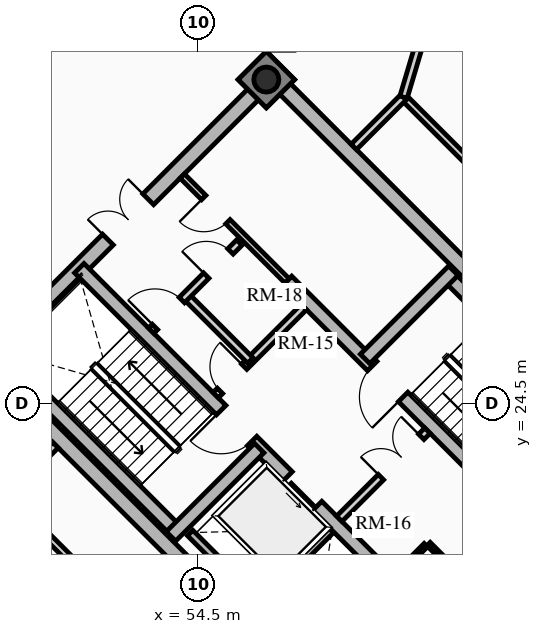
"""IFC4 building model, lengths in metres.
Left out: names, types, materials, properties, quantities, classifications, styles, units other than length and angle.
Written with IfcOpenShell. Run it as: python <this file> out.ifc"""

import sys

from ifc_helpers import new_model, si_unit, direction, frame, frame_2d, origin, origin_2d, place, context, subcontext, project, spatial, rectangle, hollow_circle, extrude, source, transform, mapped, element, fill, save


model = new_model("IFC4")
c1 = context("Model", 3, precision=1e-05, world=origin(), true_north=direction((0.0, 1.0)))
c2 = subcontext(c1, "Body", "Model", "MODEL_VIEW")
j1 = project(units=[si_unit("LENGTHUNIT", "METRE"), si_unit("PLANEANGLEUNIT", "RADIAN")], contexts=[c1])
p1 = place(None, origin())
s1 = spatial("IfcSite", under=j1, at=p1, CompositionType="ELEMENT")
p2 = place(p1, origin())
s2 = spatial("IfcBuilding", under=s1, at=p2, CompositionType="ELEMENT")
p3 = place(p2, frame((0.0, 0.0, 192.34)))
s3 = spatial("IfcBuildingStorey", under=s2, at=p3, CompositionType="ELEMENT", Elevation=192.34)
for number, where, z_axis, x_axis in (
    (1, (58.702, 15.732, 0.0), (0.0, 0.0, 1.0), (-0.707, 0.707, 0.0)),
    (2, (66.268, 23.298, 0.0), (0.0, 0.0, 1.0), (-0.707, 0.707, 0.0)),
):
    element("IfcWall", number, at=place(p3, frame(where, z_axis=z_axis, x_axis=x_axis)), inside=s3, PredefinedType="SHEAR", context=c2, shape_type="SweptSolid", body=[
        extrude(rectangle(XDim=14.1, YDim=0.4, at=frame_2d((7.05, 0.0))), origin(), (0.0, 0.0, 1.0), 4.32),
    ])
p4 = place(p3, frame((58.561, 15.873, 0.0), z_axis=(0.0, 0.0, 1.0), x_axis=(0.707106781187, 0.707106781187, 0.0)))
e3 = element("IfcWall", 3, at=p4, inside=s3, PredefinedType="SHEAR", context=c2, shape_type="SweptSolid", body=[
    extrude(rectangle(XDim=10.7, YDim=0.4, at=frame_2d((5.35, 0.0))), origin(), (0.0, 0.0, 1.0), 4.32),
])
m1 = source(origin(), c2, "Body", "SweptSolid", [
    extrude(rectangle(XDim=1.5, YDim=2.02, at=frame_2d((0.75, 1.01))), frame((0.0, 0.21, 0.0), z_axis=(0.0, -1.0, 0.0), x_axis=(1.0, 0.0, 0.0)), (0.0, 0.0, 1.0), 0.42),
])
p5 = place(p4, frame((5.45, 0.0, 0.0)))
e4 = element("IfcOpeningElement", 4, at=p5, cuts=e3, PredefinedType="OPENING", context=c2, shape_type="MappedRepresentation", body=[
    mapped(m1, transform((0.0, 0.0, 0.0), x_axis=(1.0, 0.0, 0.0), y_axis=(0.0, 1.0, 0.0), z_axis=(0.0, 0.0, 1.0), scale=1.0)),
])
p6 = place(p3, frame((48.873, 25.561, 0.0), z_axis=(0.0, 0.0, 1.0), x_axis=(0.707106781187, 0.707106781187, 0.0)))
e5 = element("IfcWall", 5, at=p6, inside=s3, PredefinedType="SHEAR", context=c2, shape_type="SweptSolid", body=[
    extrude(rectangle(XDim=10.7, YDim=0.4, at=frame_2d((5.35, 0.0))), origin(), (0.0, 0.0, 1.0), 4.32),
])
p7 = place(p6, frame((4.6, 0.0, 0.0)))
e6 = element("IfcOpeningElement", 6, at=p7, cuts=e5, PredefinedType="OPENING", context=c2, shape_type="MappedRepresentation", body=[
    mapped(m1, transform((0.0, 0.0, 0.0), x_axis=(1.0, 0.0, 0.0), y_axis=(0.0, 1.0, 0.0), z_axis=(0.0, 0.0, 1.0), scale=1.0)),
])
p8 = place(p3, frame((61.06, 18.373, 0.0), z_axis=(0.0, 0.0, 1.0), x_axis=(-0.707106781187, 0.707106781187, 0.0)))
e7 = element("IfcWall", 7, at=p8, inside=s3, PredefinedType="SHEAR", context=c2, shape_type="SweptSolid", body=[
    extrude(rectangle(XDim=13.7, YDim=0.35, at=frame_2d((6.85, 0.0))), origin(), (0.0, 0.0, 1.0), 4.32),
])
m2 = source(origin(), c2, "Body", "SweptSolid", [
    extrude(rectangle(XDim=1.1, YDim=2.015, at=frame_2d((0.55, 1.007))), frame((0.0, 0.185, 0.0), z_axis=(0.0, -1.0, 0.0), x_axis=(1.0, 0.0, 0.0)), (0.0, 0.0, 1.0), 0.37),
])
p9 = place(p8, frame((4.85, 0.0, 0.0)))
e8 = element("IfcOpeningElement", 8, at=p9, cuts=e7, PredefinedType="OPENING", context=c2, shape_type="MappedRepresentation", body=[
    mapped(m2, transform((0.0, 0.0, 0.0), x_axis=(1.0, 0.0, 0.0), y_axis=(0.0, 1.0, 0.0), z_axis=(0.0, 0.0, 1.0), scale=1.0)),
])
m3 = source(origin(), c2, "Body", "SweptSolid", [
    extrude(rectangle(XDim=1.15, YDim=2.02, at=frame_2d((0.575, 1.01))), frame((0.0, 0.185, 0.0), z_axis=(0.0, -1.0, 0.0), x_axis=(1.0, 0.0, 0.0)), (0.0, 0.0, 1.0), 0.37),
])
p10 = place(p8, frame((7.27, 0.0, 0.0)))
e9 = element("IfcOpeningElement", 9, at=p10, cuts=e7, PredefinedType="OPENING", context=c2, shape_type="MappedRepresentation", body=[
    mapped(m3, transform((0.0, 0.0, 0.0), x_axis=(1.0, 0.0, 0.0), y_axis=(0.0, 1.0, 0.0), z_axis=(0.0, 0.0, 1.0), scale=1.0)),
])
p11 = place(p3, frame((63.627, 20.94, 0.0), z_axis=(0.0, 0.0, 1.0), x_axis=(-0.707119496762, 0.707094065383, 0.0)))
e10 = element("IfcWall", 10, at=p11, inside=s3, PredefinedType="SHEAR", context=c2, shape_type="SweptSolid", body=[
    extrude(rectangle(XDim=9.6, YDim=0.35, at=frame_2d((4.8, 0.0))), origin(), (0.0, 0.0, 1.0), 4.32),
])
p12 = place(p11, frame((5.28, 0.0, 0.0)))
e11 = element("IfcOpeningElement", 11, at=p12, cuts=e10, PredefinedType="OPENING", context=c2, shape_type="MappedRepresentation", body=[
    mapped(m3, transform((0.0, 0.0, 0.0), x_axis=(1.0, 0.0, 0.0), y_axis=(0.0, 1.0, 0.0), z_axis=(0.0, 0.0, 1.0), scale=1.0)),
])
p13 = place(p3, frame((53.922, 21.141, 0.0), z_axis=(0.0, 0.0, 1.0), x_axis=(-0.707106781187, 0.707106781187, 0.0)))
e12 = element("IfcWall", 12, at=p13, inside=s3, PredefinedType="SHEAR", context=c2, shape_type="SweptSolid", body=[
    extrude(rectangle(XDim=6.695, YDim=0.35, at=frame_2d((3.348, 0.0))), origin(), (0.0, 0.0, 1.0), 4.32),
])
p14 = place(p3, frame((53.784, 21.003, 0.0), z_axis=(0.0, 0.0, 1.0), x_axis=(0.707106781187, 0.707106781187, 0.0)))
e13 = element("IfcWall", 13, at=p14, inside=s3, PredefinedType="SHEAR", context=c2, shape_type="SweptSolid", body=[
    extrude(rectangle(XDim=3.285, YDim=0.35, at=frame_2d((1.643, 0.0))), origin(), (0.0, 0.0, 1.0), 4.32),
])
p15 = place(p3, frame((65.812, 23.125, 0.0), z_axis=(0.0, 0.0, 1.0), x_axis=(-0.707106781187, 0.707106781187, 0.0)))
e14 = element("IfcWall", 14, at=p15, inside=s3, PredefinedType="SHEAR", context=c2, shape_type="SweptSolid", body=[
    extrude(rectangle(XDim=6.695, YDim=0.35, at=frame_2d((3.348, 0.0))), origin(), (0.0, 0.0, 1.0), 4.32),
])
p16 = place(p3, frame((58.893, 25.674, 0.0), z_axis=(0.0, 0.0, 1.0), x_axis=(0.707106781187, 0.707106781187, 0.0)))
e15 = element("IfcWall", 15, at=p16, inside=s3, PredefinedType="SHEAR", context=c2, shape_type="SweptSolid", body=[
    extrude(rectangle(XDim=3.285, YDim=0.35, at=frame_2d((1.643, 0.0))), origin(), (0.0, 0.0, 1.0), 4.32),
])
p17 = place(p3, frame((56.294, 33.024, 0.0), z_axis=(0.0, 0.0, 1.0), x_axis=(0.707106781187, 0.707106781187, 0.0)))
e16 = element("IfcColumn", 16, at=p17, inside=s3, PredefinedType="COLUMN", context=c2, shape_type="SweptSolid", body=[
    extrude(hollow_circle(Radius=0.33, WallThickness=0.025, at=origin_2d()), origin(), (0.0, 0.0, 1.0), 4.32),
])
p18 = place(p3, frame((55.888, 19.069, 0.0), z_axis=(0.0, 0.0, 1.0), x_axis=(0.707106781187, 0.707106781187, 0.0)))
e17 = element("IfcWall", 17, at=p18, inside=s3, PredefinedType="SHEAR", context=c2, shape_type="SweptSolid", body=[
    extrude(rectangle(XDim=2.97, YDim=0.2, at=frame_2d((1.485, 0.0))), origin(), (0.0, 0.0, 1.0), 4.32),
])
p19 = place(p3, frame((56.015, 19.366, 0.0), z_axis=(0.0, 0.0, 1.0), x_axis=(-0.707106781187, 0.707106781187, 0.0)))
e18 = element("IfcWall", 18, at=p19, inside=s3, PredefinedType="SHEAR", context=c2, shape_type="SweptSolid", body=[
    extrude(rectangle(XDim=2.44, YDim=0.2, at=frame_2d((1.22, 0.0))), origin(), (0.0, 0.0, 1.0), 4.32),
])
p20 = place(p3, frame((58.214, 21.467, 0.0), z_axis=(0.0, 0.0, 1.0), x_axis=(0.707106781187, 0.707106781187, 0.0)))
e19 = element("IfcWall", 19, at=p20, inside=s3, PredefinedType="PARTITIONING", context=c2, shape_type="SweptSolid", body=[
    extrude(rectangle(XDim=3.28, YDim=0.2, at=frame_2d((1.64, 0.0))), origin(), (0.0, 0.0, 1.0), 4.095),
])
m4 = source(origin(), c2, "Body", "SweptSolid", [
    extrude(rectangle(XDim=1.5, YDim=2.02, at=frame_2d((0.75, 1.01))), frame((0.0, 0.11, 0.0), z_axis=(0.0, -1.0, 0.0), x_axis=(1.0, 0.0, 0.0)), (0.0, 0.0, 1.0), 0.22),
])
p21 = place(p20, frame((1.55, 0.0, 0.0)))
e20 = element("IfcOpeningElement", 20, at=p21, cuts=e19, PredefinedType="OPENING", context=c2, shape_type="MappedRepresentation", body=[
    mapped(m4, transform((0.0, 0.0, 0.0), x_axis=(1.0, 0.0, 0.0), y_axis=(0.0, 1.0, 0.0), z_axis=(0.0, 0.0, 1.0), scale=1.0)),
])
p22 = place(p3, frame((54.961, 24.719, 0.0), z_axis=(0.0, 0.0, 1.0), x_axis=(0.707106781187, 0.707106781187, 0.0)))
e21 = element("IfcWall", 21, at=p22, inside=s3, PredefinedType="PARTITIONING", context=c2, shape_type="SweptSolid", body=[
    extrude(rectangle(XDim=3.28, YDim=0.2, at=frame_2d((1.64, 0.0))), origin(), (0.0, 0.0, 1.0), 4.095),
])
m5 = source(origin(), c2, "Body", "SweptSolid", [
    extrude(rectangle(XDim=0.9, YDim=2.005, at=frame_2d((0.45, 1.002))), frame((0.0, 0.11, 0.0), z_axis=(0.0, -1.0, 0.0), x_axis=(1.0, 0.0, 0.0)), (0.0, 0.0, 1.0), 0.22),
])
p23 = place(p22, frame((0.16, 0.0, 0.0)))
e22 = element("IfcOpeningElement", 22, at=p23, cuts=e21, PredefinedType="OPENING", context=c2, shape_type="MappedRepresentation", body=[
    mapped(m5, transform((0.0, 0.0, 0.0), x_axis=(1.0, 0.0, 0.0), y_axis=(0.0, 1.0, 0.0), z_axis=(0.0, 0.0, 1.0), scale=1.0)),
])
p24 = place(p3, frame((55.874, 25.631, 0.0), z_axis=(0.0, 0.0, 1.0), x_axis=(-0.707157639372, 0.707055919343, 0.0)))
e23 = element("IfcWall", 23, at=p24, inside=s3, PredefinedType="PARTITIONING", context=c2, shape_type="SweptSolid", body=[
    extrude(rectangle(XDim=2.4, YDim=0.2, at=frame_2d((1.2, 0.0))), origin(), (0.0, 0.0, 1.0), 4.095),
])
p25 = place(p3, frame((53.264, 26.416, 0.0), z_axis=(0.0, 0.0, 1.0), x_axis=(0.707106781187, 0.707106781187, 0.0)))
e24 = element("IfcWall", 24, at=p25, inside=s3, PredefinedType="PARTITIONING", context=c2, shape_type="SweptSolid", body=[
    extrude(rectangle(XDim=3.28, YDim=0.2, at=frame_2d((1.64, 0.0))), origin(), (0.0, 0.0, 1.0), 4.095),
])
m6 = source(origin(), c2, "Body", "SweptSolid", [
    extrude(rectangle(XDim=1.0, YDim=2.015, at=frame_2d((0.5, 1.007))), frame((0.0, 0.11, 0.0), z_axis=(0.0, -1.0, 0.0), x_axis=(1.0, 0.0, 0.0)), (0.0, 0.0, 1.0), 0.22),
])
p26 = place(p25, frame((0.14, 0.0, 0.0)))
e25 = element("IfcOpeningElement", 25, at=p26, cuts=e24, PredefinedType="OPENING", context=c2, shape_type="MappedRepresentation", body=[
    mapped(m6, transform((0.0, 0.0, 0.0), x_axis=(1.0, 0.0, 0.0), y_axis=(0.0, 1.0, 0.0), z_axis=(0.0, 0.0, 1.0), scale=1.0)),
])
p27 = place(p25, frame((2.05, 0.0, 0.0)))
e26 = element("IfcOpeningElement", 26, at=p27, cuts=e24, PredefinedType="OPENING", context=c2, shape_type="MappedRepresentation", body=[
    mapped(m5, transform((0.0, 0.0, 0.0), x_axis=(1.0, 0.0, 0.0), y_axis=(0.0, 1.0, 0.0), z_axis=(0.0, 0.0, 1.0), scale=1.0)),
])
p28 = place(p3, frame((61.835, 19.529, 0.0), z_axis=(0.0, 0.0, 1.0), x_axis=(-0.707174592913, 0.707038962956, 0.0)))
e27 = element("IfcWall", 27, at=p28, inside=s3, PredefinedType="PARTITIONING", context=c2, shape_type="SweptSolid", body=[
    extrude(rectangle(XDim=1.8, YDim=0.125, at=frame_2d((0.9, 0.0))), origin(), (0.0, 0.0, 1.0), 4.095),
])
m7 = source(origin(), c2, "Body", "SweptSolid", [
    extrude(rectangle(XDim=0.9, YDim=2.005, at=frame_2d((0.45, 1.002))), frame((0.0, 0.073, 0.0), z_axis=(0.0, -1.0, 0.0), x_axis=(1.0, 0.0, 0.0)), (0.0, 0.0, 1.0), 0.145),
])
p29 = place(p28, frame((0.42, 0.0, 0.0)))
e28 = element("IfcOpeningElement", 28, at=p29, cuts=e27, PredefinedType="OPENING", context=c2, shape_type="MappedRepresentation", body=[
    mapped(m7, transform((0.0, 0.0, 0.0), x_axis=(1.0, 0.0, 0.0), y_axis=(0.0, 1.0, 0.0), z_axis=(0.0, 0.0, 1.0), scale=1.0)),
])
p30 = place(p3, frame((59.713, 19.996, 0.0), z_axis=(0.0, 0.0, 1.0), x_axis=(0.707217726, 0.706995818963, 0.0)))
e29 = element("IfcWall", 29, at=p30, inside=s3, PredefinedType="PARTITIONING", context=c2, shape_type="SweptSolid", body=[
    extrude(rectangle(XDim=1.1, YDim=0.125, at=frame_2d((0.55, 0.0))), origin(), (0.0, 0.0, 1.0), 4.095),
])
p31 = place(p3, frame((56.839, 27.728, 0.0), z_axis=(0.0, 0.0, 1.0), x_axis=(-0.707106781187, 0.707106781187, 0.0)))
e30 = element("IfcWall", 30, at=p31, inside=s3, PredefinedType="PARTITIONING", context=c2, shape_type="SweptSolid", body=[
    extrude(rectangle(XDim=3.9, YDim=0.16, at=frame_2d((1.95, 0.0))), origin(), (0.0, 0.0, 1.0), 4.095),
])
m8 = source(origin(), c2, "Body", "SweptSolid", [
    extrude(rectangle(XDim=0.9, YDim=2.005, at=frame_2d((0.45, 1.002))), frame((0.0, 0.09, 0.0), z_axis=(0.0, -1.0, 0.0), x_axis=(1.0, 0.0, 0.0)), (0.0, 0.0, 1.0), 0.18),
])
p32 = place(p31, frame((2.2, 0.0, 0.0)))
e31 = element("IfcOpeningElement", 31, at=p32, cuts=e30, PredefinedType="OPENING", context=c2, shape_type="MappedRepresentation", body=[
    mapped(m8, transform((0.0, 0.0, 0.0), x_axis=(1.0, 0.0, 0.0), y_axis=(0.0, 1.0, 0.0), z_axis=(0.0, 0.0, 1.0), scale=1.0)),
])
p33 = place(p3, frame((58.419, 13.115, 0.0), z_axis=(0.0, 0.0, 1.0), x_axis=(0.707106781187, 0.707106781187, 0.0)))
e32 = element("IfcWall", 32, at=p33, inside=s3, PredefinedType="PARTITIONING", context=c2, shape_type="SweptSolid", body=[
    extrude(rectangle(XDim=14.8, YDim=0.18, at=frame_2d((7.4, 0.0))), origin(), (0.0, 0.0, 1.0), 3.386),
])
m9 = source(origin(), c2, "Body", "SweptSolid", [
    extrude(rectangle(XDim=1.4, YDim=2.02, at=frame_2d((0.7, 1.01))), frame((0.0, 0.1, 0.0), z_axis=(0.0, -1.0, 0.0), x_axis=(1.0, 0.0, 0.0)), (0.0, 0.0, 1.0), 0.2),
])
p34 = place(p33, frame((6.7, 0.0, 0.0)))
e33 = element("IfcOpeningElement", 33, at=p34, cuts=e32, PredefinedType="OPENING", context=c2, shape_type="MappedRepresentation", body=[
    mapped(m9, transform((0.0, 0.0, 0.0), x_axis=(1.0, 0.0, 0.0), y_axis=(0.0, 1.0, 0.0), z_axis=(0.0, 0.0, 1.0), scale=1.0)),
])
p35 = place(p3, frame((58.419, 13.115, 0.0), z_axis=(0.0, 0.0, 1.0), x_axis=(-0.707106781187, 0.707106781187, 0.0)))
e34 = element("IfcWall", 34, at=p35, inside=s3, PredefinedType="PARTITIONING", context=c2, shape_type="SweptSolid", body=[
    extrude(rectangle(XDim=12.7, YDim=0.18, at=frame_2d((6.35, 0.0))), origin(), (0.0, 0.0, 1.0), 3.386),
])
p36 = place(p35, frame((5.65, 0.0, 0.0)))
e35 = element("IfcOpeningElement", 35, at=p36, cuts=e34, PredefinedType="OPENING", context=c2, shape_type="MappedRepresentation", body=[
    mapped(m9, transform((0.0, 0.0, 0.0), x_axis=(1.0, 0.0, 0.0), y_axis=(0.0, 1.0, 0.0), z_axis=(0.0, 0.0, 1.0), scale=1.0)),
])
p37 = place(p3, frame((68.885, 23.581, 0.0), z_axis=(0.0, 0.0, 1.0), x_axis=(-0.707106781187, 0.707106781187, 0.0)))
e36 = element("IfcWall", 36, at=p37, inside=s3, PredefinedType="PARTITIONING", context=c2, shape_type="SweptSolid", body=[
    extrude(rectangle(XDim=12.7, YDim=0.18, at=frame_2d((6.35, 0.0))), origin(), (0.0, 0.0, 1.0), 3.386),
])
p38 = place(p37, frame((5.65, 0.0, 0.0)))
e37 = element("IfcOpeningElement", 37, at=p38, cuts=e36, PredefinedType="OPENING", context=c2, shape_type="MappedRepresentation", body=[
    mapped(m9, transform((0.0, 0.0, 0.0), x_axis=(1.0, 0.0, 0.0), y_axis=(0.0, 1.0, 0.0), z_axis=(0.0, 0.0, 1.0), scale=1.0)),
])
for number, where, z_axis, x_axis in (
    (38, (49.439, 22.096, 0.0), (0.0, 0.0, 1.0), (0.707, 0.707, 0.0)),
    (39, (58.596, 31.253, 0.0), (0.0, 0.0, 1.0), (0.707, 0.707, 0.0)),
):
    element("IfcWall", number, at=place(p3, frame(where, z_axis=z_axis, x_axis=x_axis)), inside=s3, PredefinedType="PARTITIONING", context=c2, shape_type="SweptSolid", body=[
        extrude(rectangle(XDim=1.85, YDim=0.2, at=frame_2d((0.925, 0.0))), origin(), (0.0, 0.0, 1.0), 4.095),
    ])
p39 = place(p3, frame((59.904, 32.561, 0.0), z_axis=(0.0, 0.0, 1.0), x_axis=(0.285783581439, 0.958294184778, 0.0)))
e40 = element("IfcWall", 40, at=p39, inside=s3, PredefinedType="PARTITIONING", context=c2, shape_type="SweptSolid", body=[
    extrude(rectangle(XDim=4.383, YDim=0.2, at=frame_2d((2.191, 0.0))), origin(), (0.0, 0.0, 1.0), 3.386),
])
m10 = source(origin(), c2, "Body", "SweptSolid", [
    extrude(rectangle(XDim=1.1, YDim=2.015, at=frame_2d((0.55, 1.007))), frame((0.0, 0.025, 0.0), z_axis=(0.0, -1.0, 0.0), x_axis=(1.0, 0.0, 0.0)), (0.0, 0.0, 1.0), 0.05),
])
p40 = place(p9, origin())
e41 = element("IfcDoor", 41, at=p40, inside=s3, OperationType="SLIDING_TO_LEFT", PredefinedType="DOOR", context=c2, shape_type="MappedRepresentation", body=[
    mapped(m10, transform((0.0, 0.0, 0.0), x_axis=(1.0, 0.0, 0.0), y_axis=(0.0, 1.0, 0.0), z_axis=(0.0, 0.0, 1.0), scale=1.0)),
])
fill(e8, e41)
m11 = source(origin(), c2, "Body", "SweptSolid", [
    extrude(rectangle(XDim=1.15, YDim=2.02, at=frame_2d((0.575, 1.01))), frame((0.0, 0.025, 0.0), z_axis=(0.0, -1.0, 0.0), x_axis=(1.0, 0.0, 0.0)), (0.0, 0.0, 1.0), 0.05),
])
p41 = place(p10, origin())
e42 = element("IfcDoor", 42, at=p41, inside=s3, OperationType="SINGLE_SWING_RIGHT", PredefinedType="DOOR", context=c2, shape_type="MappedRepresentation", body=[
    mapped(m11, transform((0.0, 0.0, 0.0), x_axis=(1.0, 0.0, 0.0), y_axis=(0.0, 1.0, 0.0), z_axis=(0.0, 0.0, 1.0), scale=1.0)),
])
fill(e9, e42)
p42 = place(p12, origin())
e43 = element("IfcDoor", 43, at=p42, inside=s3, OperationType="SINGLE_SWING_LEFT", PredefinedType="DOOR", context=c2, shape_type="MappedRepresentation", body=[
    mapped(m11, transform((0.0, 0.0, 0.0), x_axis=(1.0, 0.0, 0.0), y_axis=(0.0, 1.0, 0.0), z_axis=(0.0, 0.0, 1.0), scale=1.0)),
])
fill(e11, e43)
m12 = source(origin(), c2, "Body", "SweptSolid", [
    extrude(rectangle(XDim=1.5, YDim=2.02, at=frame_2d((0.75, 1.01))), frame((0.0, 0.025, 0.0), z_axis=(0.0, -1.0, 0.0), x_axis=(1.0, 0.0, 0.0)), (0.0, 0.0, 1.0), 0.05),
])
p43 = place(p7, origin())
e44 = element("IfcDoor", 44, at=p43, inside=s3, OperationType="DOUBLE_DOOR_SINGLE_SWING", PredefinedType="DOOR", context=c2, shape_type="MappedRepresentation", body=[
    mapped(m12, transform((0.0, 0.0, 0.0), x_axis=(1.0, 0.0, 0.0), y_axis=(0.0, 1.0, 0.0), z_axis=(0.0, 0.0, 1.0), scale=1.0)),
])
fill(e6, e44)
p44 = place(p21, origin())
e45 = element("IfcDoor", 45, at=p44, inside=s3, OperationType="DOUBLE_DOOR_SINGLE_SWING", PredefinedType="DOOR", context=c2, shape_type="MappedRepresentation", body=[
    mapped(m12, transform((0.0, 0.0, 0.0), x_axis=(1.0, 0.0, 0.0), y_axis=(0.0, 1.0, 0.0), z_axis=(0.0, 0.0, 1.0), scale=1.0)),
])
fill(e20, e45)
m13 = source(origin(), c2, "Body", "SweptSolid", [
    extrude(rectangle(XDim=0.9, YDim=2.005, at=frame_2d((0.45, 1.002))), frame((0.0, 0.025, 0.0), z_axis=(0.0, -1.0, 0.0), x_axis=(1.0, 0.0, 0.0)), (0.0, 0.0, 1.0), 0.05),
])
p45 = place(p23, origin())
e46 = element("IfcDoor", 46, at=p45, inside=s3, OperationType="SINGLE_SWING_RIGHT", PredefinedType="DOOR", context=c2, shape_type="MappedRepresentation", body=[
    mapped(m13, transform((0.0, 0.0, 0.0), x_axis=(1.0, 0.0, 0.0), y_axis=(0.0, 1.0, 0.0), z_axis=(0.0, 0.0, 1.0), scale=1.0)),
])
fill(e22, e46)
m14 = source(origin(), c2, "Body", "SweptSolid", [
    extrude(rectangle(XDim=1.0, YDim=2.015, at=frame_2d((0.5, 1.007))), frame((0.0, 0.025, 0.0), z_axis=(0.0, -1.0, 0.0), x_axis=(1.0, 0.0, 0.0)), (0.0, 0.0, 1.0), 0.05),
])
p46 = place(p26, origin())
e47 = element("IfcDoor", 47, at=p46, inside=s3, OperationType="SINGLE_SWING_LEFT", PredefinedType="DOOR", context=c2, shape_type="MappedRepresentation", body=[
    mapped(m14, transform((0.0, 0.0, 0.0), x_axis=(1.0, 0.0, 0.0), y_axis=(0.0, 1.0, 0.0), z_axis=(0.0, 0.0, 1.0), scale=1.0)),
])
fill(e25, e47)
p47 = place(p27, origin())
e48 = element("IfcDoor", 48, at=p47, inside=s3, OperationType="SINGLE_SWING_LEFT", PredefinedType="DOOR", context=c2, shape_type="MappedRepresentation", body=[
    mapped(m13, transform((0.0, 0.0, 0.0), x_axis=(1.0, 0.0, 0.0), y_axis=(0.0, 1.0, 0.0), z_axis=(0.0, 0.0, 1.0), scale=1.0)),
])
fill(e26, e48)
p48 = place(p32, origin())
e49 = element("IfcDoor", 49, at=p48, inside=s3, OperationType="SINGLE_SWING_RIGHT", PredefinedType="DOOR", context=c2, shape_type="MappedRepresentation", body=[
    mapped(m13, transform((0.0, 0.0, 0.0), x_axis=(1.0, 0.0, 0.0), y_axis=(0.0, 1.0, 0.0), z_axis=(0.0, 0.0, 1.0), scale=1.0)),
])
fill(e31, e49)
save(model, sys.argv[1])
